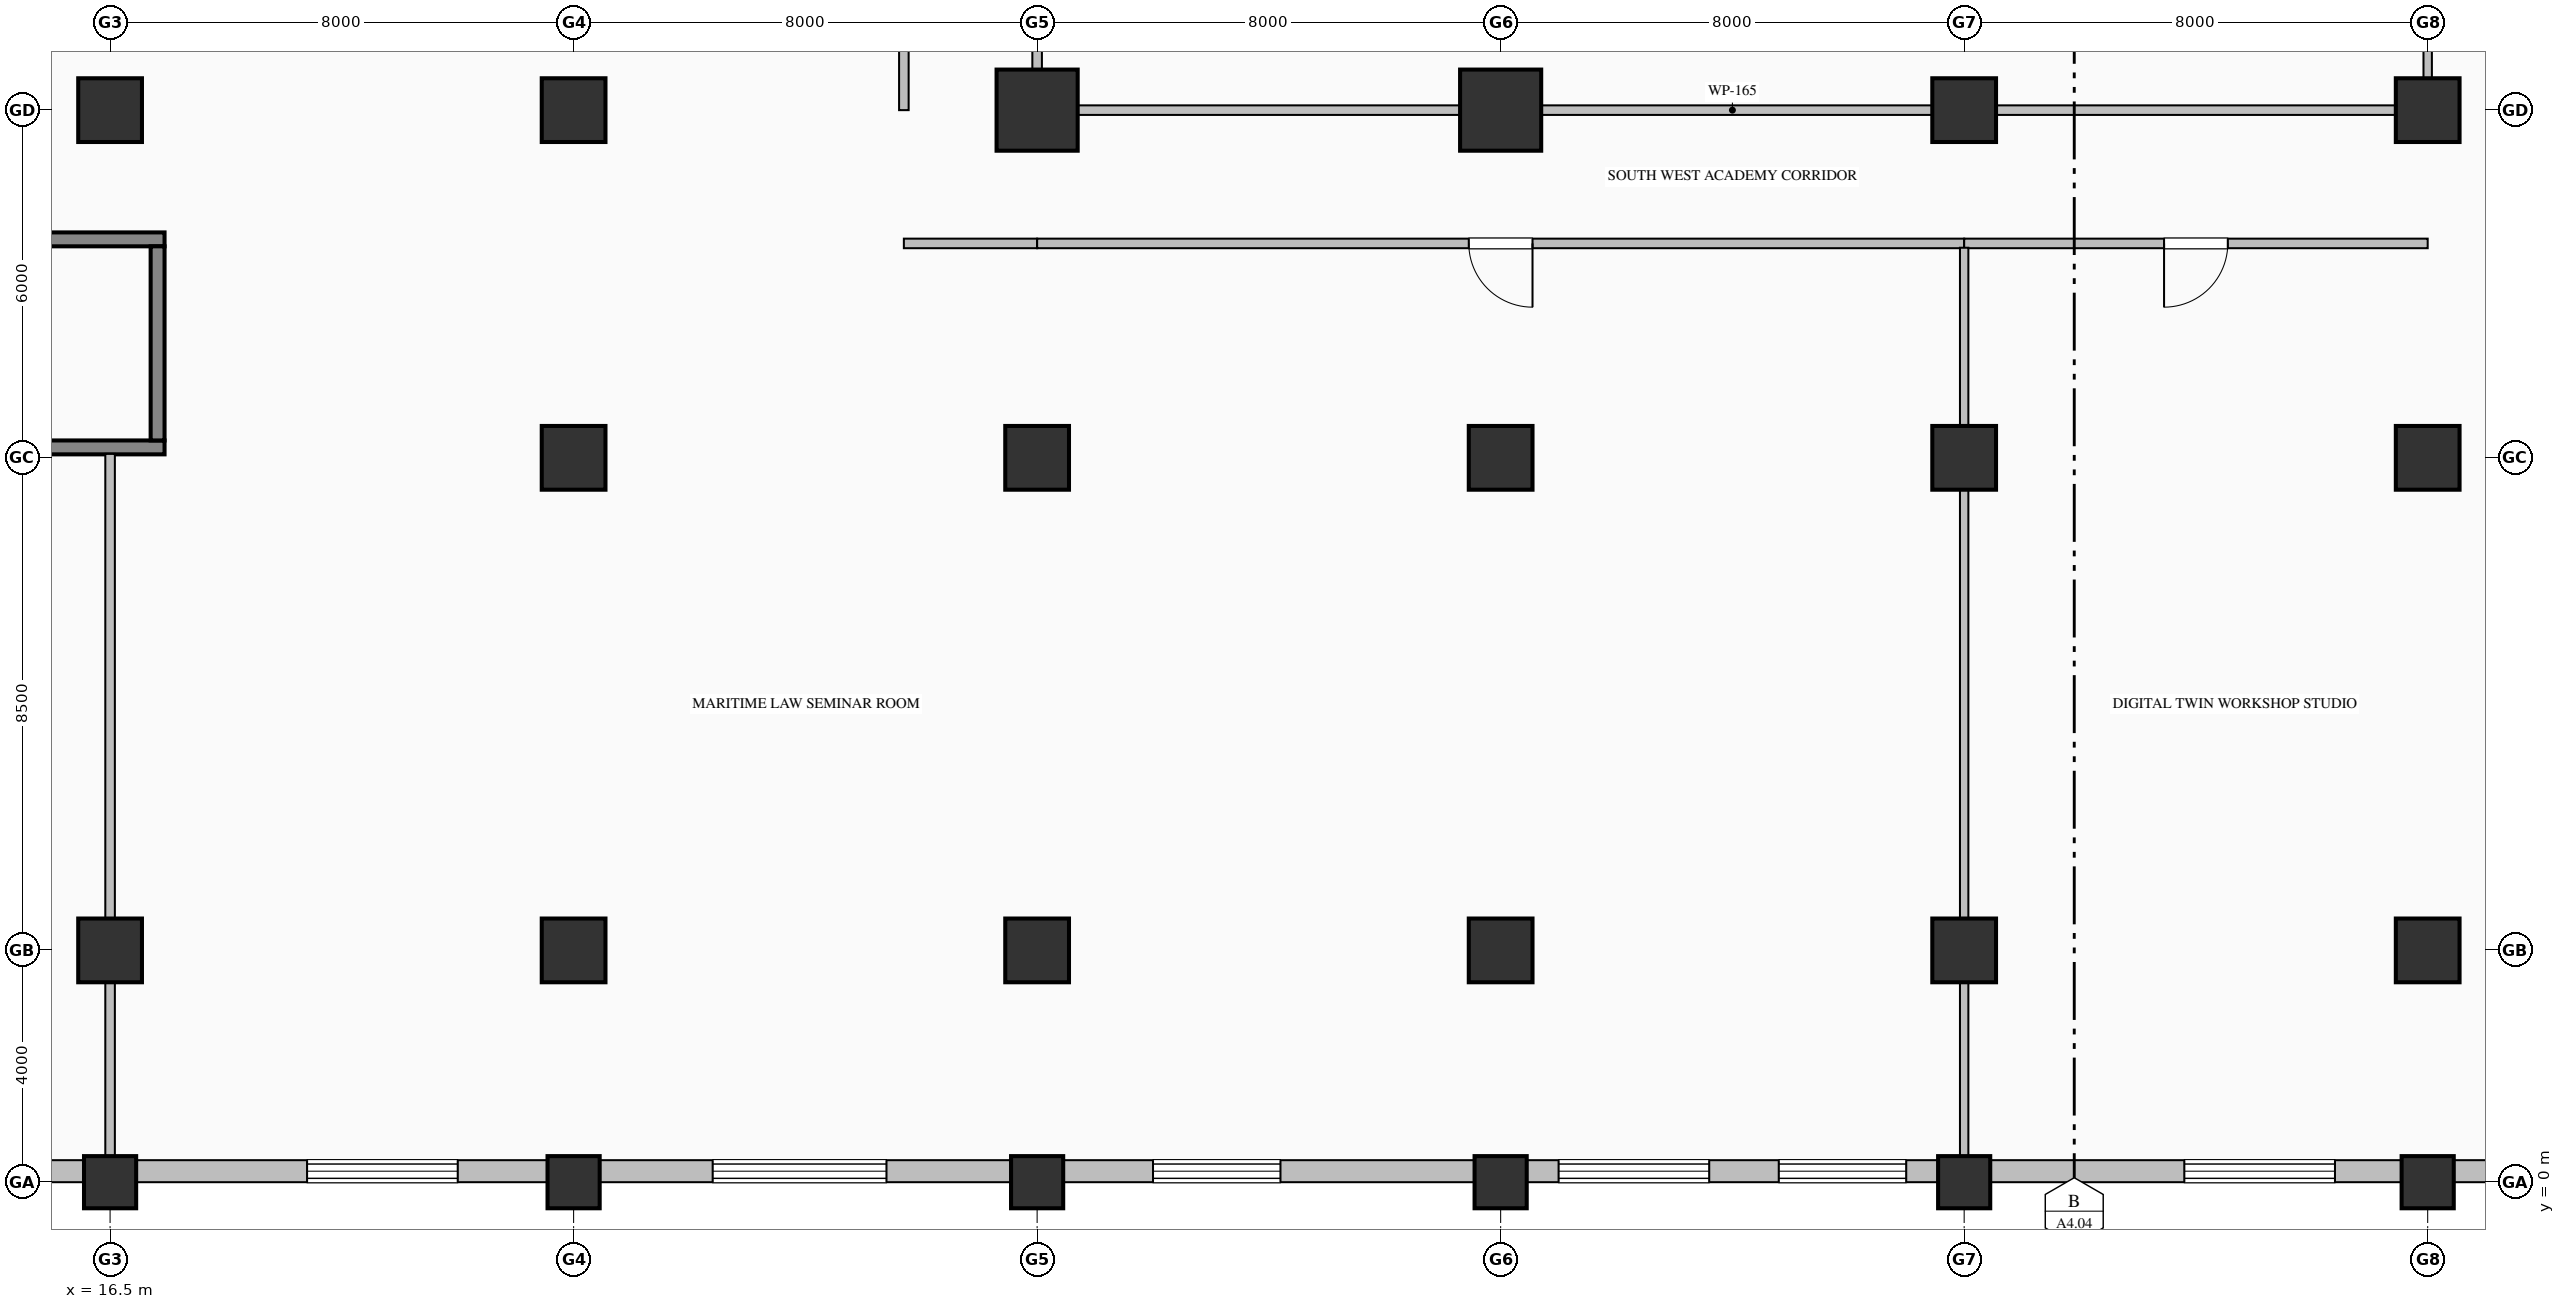
"""IFC4 building model, lengths in metres.
Left out: names, types, materials, properties, quantities, classifications, styles, units other than length and angle.
Written with IfcOpenShell. Run it as: python <this file> out.ifc"""

import sys

from ifc_helpers import new_model, si_unit, direction, frame, frame_2d, origin, origin_2d, place, context, subcontext, project, spatial, rectangle, hollow_rectangle, extrude, element, fill, save


model = new_model("IFC4")
c1 = context("Model", 3, precision=1e-05, world=origin(), true_north=direction((0.0, 1.0)))
c2 = subcontext(c1, "Body", "Model", "MODEL_VIEW")
j1 = project(units=[si_unit("LENGTHUNIT", "METRE"), si_unit("PLANEANGLEUNIT", "RADIAN")], contexts=[c1])
p1 = place(None, origin())
s1 = spatial("IfcSite", under=j1, at=p1, CompositionType="ELEMENT")
p2 = place(p1, origin())
s2 = spatial("IfcBuilding", under=s1, at=p2, CompositionType="ELEMENT")
p3 = place(p2, frame((0.0, 0.0, 17.4)))
s3 = spatial("IfcBuildingStorey", under=s2, at=p3, CompositionType="ELEMENT", Elevation=17.4)
p4 = place(p3, frame((16.5, 0.0, 0.0), z_axis=(0.0, 0.0, 1.0), x_axis=(1.0, 0.0, 0.0)))
e1 = element("IfcColumn", 1, at=p4, inside=s3, PredefinedType="PILASTER", context=c2, shape_type="SweptSolid", body=[
    extrude(rectangle(XDim=0.9, YDim=0.9, at=origin_2d()), origin(), (0.0, 0.0, 1.0), 5.4),
])
p5 = place(p3, frame((16.5, 4.0, 0.0), z_axis=(0.0, 0.0, 1.0), x_axis=(1.0, 0.0, 0.0)))
e2 = element("IfcColumn", 2, at=p5, inside=s3, PredefinedType="COLUMN", context=c2, shape_type="SweptSolid", body=[
    extrude(rectangle(XDim=1.1, YDim=1.1, at=origin_2d()), origin(), (0.0, 0.0, 1.0), 5.4),
])
p6 = place(p3, frame((16.5, 18.5, -0.45), z_axis=(0.0, 0.0, 1.0), x_axis=(1.0, 0.0, 0.0)))
e3 = element("IfcColumn", 3, at=p6, inside=s3, PredefinedType="COLUMN", context=c2, shape_type="SweptSolid", body=[
    extrude(rectangle(XDim=1.1, YDim=1.1, at=origin_2d()), origin(), (0.0, 0.0, 1.0), 5.85),
])
p7 = place(p3, frame((24.5, 0.0, 0.0), z_axis=(0.0, 0.0, 1.0), x_axis=(1.0, 0.0, 0.0)))
e4 = element("IfcColumn", 4, at=p7, inside=s3, PredefinedType="PILASTER", context=c2, shape_type="SweptSolid", body=[
    extrude(rectangle(XDim=0.9, YDim=0.9, at=origin_2d()), origin(), (0.0, 0.0, 1.0), 5.4),
])
for number, where, z_axis, x_axis in (
    (5, (24.5, 4.0, 0.0), (0.0, 0.0, 1.0), (1.0, 0.0, 0.0)),
    (6, (24.5, 12.5, 0.0), (0.0, 0.0, 1.0), (1.0, 0.0, 0.0)),
):
    element("IfcColumn", number, at=place(p3, frame(where, z_axis=z_axis, x_axis=x_axis)), inside=s3, PredefinedType="COLUMN", context=c2, shape_type="SweptSolid", body=[
        extrude(rectangle(XDim=1.1, YDim=1.1, at=origin_2d()), origin(), (0.0, 0.0, 1.0), 5.4),
    ])
p8 = place(p3, frame((24.5, 18.5, -0.45), z_axis=(0.0, 0.0, 1.0), x_axis=(1.0, 0.0, 0.0)))
e7 = element("IfcColumn", 7, at=p8, inside=s3, PredefinedType="COLUMN", context=c2, shape_type="SweptSolid", body=[
    extrude(rectangle(XDim=1.1, YDim=1.1, at=origin_2d()), origin(), (0.0, 0.0, 1.0), 5.85),
])
p9 = place(p3, frame((32.5, 0.0, 0.0), z_axis=(0.0, 0.0, 1.0), x_axis=(1.0, 0.0, 0.0)))
e8 = element("IfcColumn", 8, at=p9, inside=s3, PredefinedType="PILASTER", context=c2, shape_type="SweptSolid", body=[
    extrude(rectangle(XDim=0.9, YDim=0.9, at=origin_2d()), origin(), (0.0, 0.0, 1.0), 5.4),
])
for number, where, z_axis, x_axis in (
    (9, (32.5, 4.0, 0.0), (0.0, 0.0, 1.0), (1.0, 0.0, 0.0)),
    (10, (32.5, 12.5, 0.0), (0.0, 0.0, 1.0), (1.0, 0.0, 0.0)),
):
    element("IfcColumn", number, at=place(p3, frame(where, z_axis=z_axis, x_axis=x_axis)), inside=s3, PredefinedType="COLUMN", context=c2, shape_type="SweptSolid", body=[
        extrude(rectangle(XDim=1.1, YDim=1.1, at=origin_2d()), origin(), (0.0, 0.0, 1.0), 5.4),
    ])
p10 = place(p3, frame((32.5, 18.5, 0.0), z_axis=(0.0, 0.0, 1.0), x_axis=(1.0, 0.0, 0.0)))
e11 = element("IfcColumn", 11, at=p10, inside=s3, PredefinedType="COLUMN", context=c2, shape_type="SweptSolid", body=[
    extrude(hollow_rectangle(XDim=1.4, YDim=1.4, WallThickness=0.05, at=origin_2d()), origin(), (0.0, 0.0, 1.0), 5.4),
])
p11 = place(p3, frame((40.5, 0.0, 0.0), z_axis=(0.0, 0.0, 1.0), x_axis=(1.0, 0.0, 0.0)))
e12 = element("IfcColumn", 12, at=p11, inside=s3, PredefinedType="PILASTER", context=c2, shape_type="SweptSolid", body=[
    extrude(rectangle(XDim=0.9, YDim=0.9, at=origin_2d()), origin(), (0.0, 0.0, 1.0), 5.4),
])
for number, where, z_axis, x_axis in (
    (13, (40.5, 4.0, 0.0), (0.0, 0.0, 1.0), (1.0, 0.0, 0.0)),
    (14, (40.5, 12.5, 0.0), (0.0, 0.0, 1.0), (1.0, 0.0, 0.0)),
):
    element("IfcColumn", number, at=place(p3, frame(where, z_axis=z_axis, x_axis=x_axis)), inside=s3, PredefinedType="COLUMN", context=c2, shape_type="SweptSolid", body=[
        extrude(rectangle(XDim=1.1, YDim=1.1, at=origin_2d()), origin(), (0.0, 0.0, 1.0), 5.4),
    ])
p12 = place(p3, frame((40.5, 18.5, 0.0), z_axis=(0.0, 0.0, 1.0), x_axis=(1.0, 0.0, 0.0)))
e15 = element("IfcColumn", 15, at=p12, inside=s3, PredefinedType="COLUMN", context=c2, shape_type="SweptSolid", body=[
    extrude(hollow_rectangle(XDim=1.4, YDim=1.4, WallThickness=0.05, at=origin_2d()), origin(), (0.0, 0.0, 1.0), 5.4),
])
p13 = place(p3, frame((48.5, 0.0, 0.0), z_axis=(0.0, 0.0, 1.0), x_axis=(1.0, 0.0, 0.0)))
e16 = element("IfcColumn", 16, at=p13, inside=s3, PredefinedType="PILASTER", context=c2, shape_type="SweptSolid", body=[
    extrude(rectangle(XDim=0.9, YDim=0.9, at=origin_2d()), origin(), (0.0, 0.0, 1.0), 5.4),
])
for number, where, z_axis, x_axis in (
    (17, (48.5, 4.0, 0.0), (0.0, 0.0, 1.0), (1.0, 0.0, 0.0)),
    (18, (48.5, 12.5, 0.0), (0.0, 0.0, 1.0), (1.0, 0.0, 0.0)),
    (19, (48.5, 18.5, 0.0), (0.0, 0.0, 1.0), (1.0, 0.0, 0.0)),
):
    element("IfcColumn", number, at=place(p3, frame(where, z_axis=z_axis, x_axis=x_axis)), inside=s3, PredefinedType="COLUMN", context=c2, shape_type="SweptSolid", body=[
        extrude(rectangle(XDim=1.1, YDim=1.1, at=origin_2d()), origin(), (0.0, 0.0, 1.0), 5.4),
    ])
p14 = place(p3, frame((56.5, 0.0, 0.0), z_axis=(0.0, 0.0, 1.0), x_axis=(1.0, 0.0, 0.0)))
e20 = element("IfcColumn", 20, at=p14, inside=s3, PredefinedType="PILASTER", context=c2, shape_type="SweptSolid", body=[
    extrude(rectangle(XDim=0.9, YDim=0.9, at=origin_2d()), origin(), (0.0, 0.0, 1.0), 5.4),
])
for number, where, z_axis, x_axis in (
    (21, (56.5, 4.0, 0.0), (0.0, 0.0, 1.0), (1.0, 0.0, 0.0)),
    (22, (56.5, 12.5, 0.0), (0.0, 0.0, 1.0), (1.0, 0.0, 0.0)),
    (23, (56.5, 18.5, 0.0), (0.0, 0.0, 1.0), (1.0, 0.0, 0.0)),
):
    element("IfcColumn", number, at=place(p3, frame(where, z_axis=z_axis, x_axis=x_axis)), inside=s3, PredefinedType="COLUMN", context=c2, shape_type="SweptSolid", body=[
        extrude(rectangle(XDim=1.1, YDim=1.1, at=origin_2d()), origin(), (0.0, 0.0, 1.0), 5.4),
    ])
p15 = place(p3, frame((68.0, 0.19, 0.0), z_axis=(0.0, 0.0, 1.0), x_axis=(-1.0, 0.0, 0.0)))
e24 = element("IfcWall", 24, at=p15, inside=s3, PredefinedType="SOLIDWALL", context=c2, shape_type="SweptSolid", body=[
    extrude(rectangle(XDim=64.0, YDim=0.38, at=frame_2d((32.0, 0.0))), origin(), (0.0, 0.0, 1.0), 4.64),
])
p16 = place(p15, frame((5.7, 0.0, 0.85)))
e25 = element("IfcOpeningElement", 25, at=p16, cuts=e24, PredefinedType="OPENING", context=c2, shape_type="SweptSolid", body=[
    extrude(rectangle(XDim=3.0, YDim=3.2, at=frame_2d((1.5, 1.6))), frame((0.0, 0.2, 0.0), z_axis=(0.0, -1.0, 0.0), x_axis=(1.0, 0.0, 0.0)), (0.0, 0.0, 1.0), 0.4),
])
p17 = place(p15, frame((13.1, 0.0, 0.85)))
e26 = element("IfcOpeningElement", 26, at=p17, cuts=e24, PredefinedType="OPENING", context=c2, shape_type="SweptSolid", body=[
    extrude(rectangle(XDim=2.6, YDim=3.1, at=frame_2d((1.3, 1.55))), frame((0.0, 0.2, 0.0), z_axis=(0.0, -1.0, 0.0), x_axis=(1.0, 0.0, 0.0)), (0.0, 0.0, 1.0), 0.4),
])
p18 = place(p15, frame((20.5, 0.0, 0.9)))
e27 = element("IfcOpeningElement", 27, at=p18, cuts=e24, PredefinedType="OPENING", context=c2, shape_type="SweptSolid", body=[
    extrude(rectangle(XDim=2.2, YDim=2.65, at=frame_2d((1.1, 1.325))), frame((0.0, 0.2, 0.0), z_axis=(0.0, -1.0, 0.0), x_axis=(1.0, 0.0, 0.0)), (0.0, 0.0, 1.0), 0.4),
])
p19 = place(p15, frame((23.9, 0.0, 0.85)))
e28 = element("IfcOpeningElement", 28, at=p19, cuts=e24, PredefinedType="OPENING", context=c2, shape_type="SweptSolid", body=[
    extrude(rectangle(XDim=2.6, YDim=3.1, at=frame_2d((1.3, 1.55))), frame((0.0, 0.2, 0.0), z_axis=(0.0, -1.0, 0.0), x_axis=(1.0, 0.0, 0.0)), (0.0, 0.0, 1.0), 0.4),
])
p20 = place(p15, frame((31.3, 0.0, 0.9)))
e29 = element("IfcOpeningElement", 29, at=p20, cuts=e24, PredefinedType="OPENING", context=c2, shape_type="SweptSolid", body=[
    extrude(rectangle(XDim=2.2, YDim=2.65, at=frame_2d((1.1, 1.325))), frame((0.0, 0.2, 0.0), z_axis=(0.0, -1.0, 0.0), x_axis=(1.0, 0.0, 0.0)), (0.0, 0.0, 1.0), 0.4),
])
p21 = place(p15, frame((38.1, 0.0, 0.85)))
e30 = element("IfcOpeningElement", 30, at=p21, cuts=e24, PredefinedType="OPENING", context=c2, shape_type="SweptSolid", body=[
    extrude(rectangle(XDim=3.0, YDim=3.2, at=frame_2d((1.5, 1.6))), frame((0.0, 0.2, 0.0), z_axis=(0.0, -1.0, 0.0), x_axis=(1.0, 0.0, 0.0)), (0.0, 0.0, 1.0), 0.4),
])
p22 = place(p15, frame((45.5, 0.0, 0.85)))
e31 = element("IfcOpeningElement", 31, at=p22, cuts=e24, PredefinedType="OPENING", context=c2, shape_type="SweptSolid", body=[
    extrude(rectangle(XDim=2.6, YDim=3.1, at=frame_2d((1.3, 1.55))), frame((0.0, 0.2, 0.0), z_axis=(0.0, -1.0, 0.0), x_axis=(1.0, 0.0, 0.0)), (0.0, 0.0, 1.0), 0.4),
])
p23 = place(p15, frame((52.9, 0.0, 0.9)))
e32 = element("IfcOpeningElement", 32, at=p23, cuts=e24, PredefinedType="OPENING", context=c2, shape_type="SweptSolid", body=[
    extrude(rectangle(XDim=2.2, YDim=2.65, at=frame_2d((1.1, 1.325))), frame((0.0, 0.2, 0.0), z_axis=(0.0, -1.0, 0.0), x_axis=(1.0, 0.0, 0.0)), (0.0, 0.0, 1.0), 0.4),
])
for number, where, z_axis, x_axis in (
    (33, (9.16, 16.27, 0.0), (0.0, 0.0, 1.0), (1.0, 0.0, 0.0)),
    (34, (17.44, 12.68, 0.0), (0.0, 0.0, 1.0), (-1.0, 0.0, 0.0)),
):
    element("IfcWall", number, at=place(p3, frame(where, z_axis=z_axis, x_axis=x_axis)), inside=s3, PredefinedType="SOLIDWALL", context=c2, shape_type="SweptSolid", body=[
        extrude(rectangle(XDim=8.28, YDim=0.24, at=frame_2d((4.14, 0.0))), origin(), (0.0, 0.0, 1.0), 5.4),
    ])
p24 = place(p3, frame((17.32, 12.8, 0.0), z_axis=(0.0, 0.0, 1.0), x_axis=(0.0, 1.0, 0.0)))
e35 = element("IfcWall", 35, at=p24, inside=s3, PredefinedType="SOLIDWALL", context=c2, shape_type="SweptSolid", body=[
    extrude(rectangle(XDim=3.35, YDim=0.24, at=frame_2d((1.675, 0.0))), origin(), (0.0, 0.0, 1.0), 5.4),
])
p25 = place(p3, frame((32.5, 31.726, 0.0), z_axis=(0.0, 0.0, 1.0), x_axis=(0.0, -1.0, 0.0)))
e36 = element("IfcWall", 36, at=p25, inside=s3, PredefinedType="PARTITIONING", context=c2, shape_type="SweptSolid", body=[
    extrude(rectangle(XDim=13.151, YDim=0.165, at=frame_2d((6.576, 0.0))), origin(), (0.0, 0.0, 1.0), 4.232),
])
p26 = place(p3, frame((30.2, 18.5, 0.0), z_axis=(0.0, 0.0, 1.0), x_axis=(0.0, 1.0, 0.0)))
e37 = element("IfcWall", 37, at=p26, inside=s3, PredefinedType="PARTITIONING", context=c2, shape_type="SweptSolid", body=[
    extrude(rectangle(XDim=13.226, YDim=0.165, at=frame_2d((6.613, 0.0))), origin(), (0.0, 0.0, 1.0), 5.14),
])
p27 = place(p3, frame((32.5, 16.2, 0.0), z_axis=(0.0, 0.0, 1.0), x_axis=(-1.0, 0.0, 0.0)))
e38 = element("IfcWall", 38, at=p27, inside=s3, PredefinedType="PARTITIONING", context=c2, shape_type="SweptSolid", body=[
    extrude(rectangle(XDim=2.3, YDim=0.165, at=frame_2d((1.15, 0.0))), origin(), (0.0, 0.0, 1.0), 5.14),
])
p28 = place(p3, frame((32.5, 18.5, 0.0), z_axis=(0.0, 0.0, 1.0), x_axis=(1.0, 0.0, 0.0)))
e39 = element("IfcWall", 39, at=p28, inside=s3, PredefinedType="PARTITIONING", context=c2, shape_type="SweptSolid", body=[
    extrude(rectangle(XDim=24.0, YDim=0.165, at=frame_2d((12.0, 0.0))), origin(), (0.0, 0.0, 1.0), 4.232),
])
p29 = place(p3, frame((48.5, 16.2, 0.0), z_axis=(0.0, 0.0, 1.0), x_axis=(-1.0, 0.0, 0.0)))
e40 = element("IfcWall", 40, at=p29, inside=s3, PredefinedType="PARTITIONING", context=c2, shape_type="SweptSolid", body=[
    extrude(rectangle(XDim=16.0, YDim=0.165, at=frame_2d((8.0, 0.0))), origin(), (0.0, 0.0, 1.0), 5.14),
])
p30 = place(p29, frame((7.45, 0.0, 0.0)))
e41 = element("IfcOpeningElement", 41, at=p30, cuts=e40, PredefinedType="OPENING", context=c2, shape_type="SweptSolid", body=[
    extrude(rectangle(XDim=1.1, YDim=2.2, at=frame_2d((0.55, 1.1))), frame((0.0, 0.093, 0.0), z_axis=(0.0, -1.0, 0.0), x_axis=(1.0, 0.0, 0.0)), (0.0, 0.0, 1.0), 0.185),
])
p31 = place(p3, frame((56.5, 16.2, 0.0), z_axis=(0.0, 0.0, 1.0), x_axis=(-1.0, 0.0, 0.0)))
e42 = element("IfcWall", 42, at=p31, inside=s3, PredefinedType="PARTITIONING", context=c2, shape_type="SweptSolid", body=[
    extrude(rectangle(XDim=8.0, YDim=0.165, at=frame_2d((4.0, 0.0))), origin(), (0.0, 0.0, 1.0), 5.14),
])
p32 = place(p31, frame((3.45, 0.0, 0.0)))
e43 = element("IfcOpeningElement", 43, at=p32, cuts=e42, PredefinedType="OPENING", context=c2, shape_type="SweptSolid", body=[
    extrude(rectangle(XDim=1.1, YDim=2.2, at=frame_2d((0.55, 1.1))), frame((0.0, 0.093, 0.0), z_axis=(0.0, -1.0, 0.0), x_axis=(1.0, 0.0, 0.0)), (0.0, 0.0, 1.0), 0.185),
])
p33 = place(p3, frame((56.5, 31.726, 0.0), z_axis=(0.0, 0.0, 1.0), x_axis=(0.0, -1.0, 0.0)))
e44 = element("IfcWall", 44, at=p33, inside=s3, PredefinedType="PARTITIONING", context=c2, shape_type="SweptSolid", body=[
    extrude(rectangle(XDim=13.151, YDim=0.145, at=frame_2d((6.576, 0.0))), origin(), (0.0, 0.0, 1.0), 4.232),
])
p34 = place(p3, frame((48.5, 16.125, 0.0), z_axis=(0.0, 0.0, 1.0), x_axis=(0.0, -1.0, 0.0)))
e45 = element("IfcWall", 45, at=p34, inside=s3, PredefinedType="PARTITIONING", context=c2, shape_type="SweptSolid", body=[
    extrude(rectangle(XDim=15.753, YDim=0.145, at=frame_2d((7.877, 0.0))), origin(), (0.0, 0.0, 1.0), 4.232),
])
p35 = place(p3, frame((16.5, 0.372, 0.0), z_axis=(0.0, 0.0, 1.0), x_axis=(0.0, 1.0, 0.0)))
e46 = element("IfcWall", 46, at=p35, inside=s3, PredefinedType="PARTITIONING", context=c2, shape_type="SweptSolid", body=[
    extrude(rectangle(XDim=12.196, YDim=0.165, at=frame_2d((6.098, 0.0))), origin(), (0.0, 0.0, 1.0), 4.232),
])
p36 = place(p17, origin())
e47 = element("IfcWindow", 47, at=p36, inside=s3, PartitioningType="TRIPLE_PANEL_VERTICAL", PredefinedType="WINDOW", context=c2, shape_type="SweptSolid", body=[
    extrude(rectangle(XDim=2.6, YDim=3.1, at=frame_2d((1.3, 1.55))), frame((0.0, 0.15, 0.0), z_axis=(0.0, -1.0, 0.0), x_axis=(1.0, 0.0, 0.0)), (0.0, 0.0, 1.0), 0.06),
])
fill(e26, e47)
p37 = place(p18, origin())
e48 = element("IfcWindow", 48, at=p37, inside=s3, PartitioningType="TRIPLE_PANEL_VERTICAL", PredefinedType="WINDOW", context=c2, shape_type="SweptSolid", body=[
    extrude(rectangle(XDim=2.2, YDim=2.65, at=frame_2d((1.1, 1.325))), frame((0.0, 0.15, 0.0), z_axis=(0.0, -1.0, 0.0), x_axis=(1.0, 0.0, 0.0)), (0.0, 0.0, 1.0), 0.06),
])
fill(e27, e48)
p38 = place(p19, origin())
e49 = element("IfcWindow", 49, at=p38, inside=s3, PartitioningType="TRIPLE_PANEL_VERTICAL", PredefinedType="WINDOW", context=c2, shape_type="SweptSolid", body=[
    extrude(rectangle(XDim=2.6, YDim=3.1, at=frame_2d((1.3, 1.55))), frame((0.0, 0.15, 0.0), z_axis=(0.0, -1.0, 0.0), x_axis=(1.0, 0.0, 0.0)), (0.0, 0.0, 1.0), 0.06),
])
fill(e28, e49)
p39 = place(p20, origin())
e50 = element("IfcWindow", 50, at=p39, inside=s3, PartitioningType="TRIPLE_PANEL_VERTICAL", PredefinedType="WINDOW", context=c2, shape_type="SweptSolid", body=[
    extrude(rectangle(XDim=2.2, YDim=2.65, at=frame_2d((1.1, 1.325))), frame((0.0, 0.15, 0.0), z_axis=(0.0, -1.0, 0.0), x_axis=(1.0, 0.0, 0.0)), (0.0, 0.0, 1.0), 0.06),
])
fill(e29, e50)
p40 = place(p21, origin())
e51 = element("IfcWindow", 51, at=p40, inside=s3, PartitioningType="TRIPLE_PANEL_VERTICAL", PredefinedType="WINDOW", context=c2, shape_type="SweptSolid", body=[
    extrude(rectangle(XDim=3.0, YDim=3.2, at=frame_2d((1.5, 1.6))), frame((0.0, 0.15, 0.0), z_axis=(0.0, -1.0, 0.0), x_axis=(1.0, 0.0, 0.0)), (0.0, 0.0, 1.0), 0.06),
])
fill(e30, e51)
p41 = place(p22, origin())
e52 = element("IfcWindow", 52, at=p41, inside=s3, PartitioningType="TRIPLE_PANEL_VERTICAL", PredefinedType="WINDOW", context=c2, shape_type="SweptSolid", body=[
    extrude(rectangle(XDim=2.6, YDim=3.1, at=frame_2d((1.3, 1.55))), frame((0.0, 0.15, 0.0), z_axis=(0.0, -1.0, 0.0), x_axis=(1.0, 0.0, 0.0)), (0.0, 0.0, 1.0), 0.06),
])
fill(e31, e52)
p42 = place(p30, origin())
e53 = element("IfcDoor", 53, at=p42, inside=s3, OperationType="SINGLE_SWING_LEFT", PredefinedType="DOOR", context=c2, shape_type="SweptSolid", body=[
    extrude(rectangle(XDim=1.1, YDim=2.2, at=frame_2d((0.55, 1.1))), frame((0.0, 0.025, 0.0), z_axis=(0.0, -1.0, 0.0), x_axis=(1.0, 0.0, 0.0)), (0.0, 0.0, 1.0), 0.05),
])
fill(e41, e53)
p43 = place(p32, origin())
e54 = element("IfcDoor", 54, at=p43, inside=s3, OperationType="SINGLE_SWING_RIGHT", PredefinedType="DOOR", context=c2, shape_type="SweptSolid", body=[
    extrude(rectangle(XDim=1.1, YDim=2.2, at=frame_2d((0.55, 1.1))), frame((0.0, 0.025, 0.0), z_axis=(0.0, -1.0, 0.0), x_axis=(1.0, 0.0, 0.0)), (0.0, 0.0, 1.0), 0.05),
])
fill(e43, e54)
save(model, sys.argv[1])
